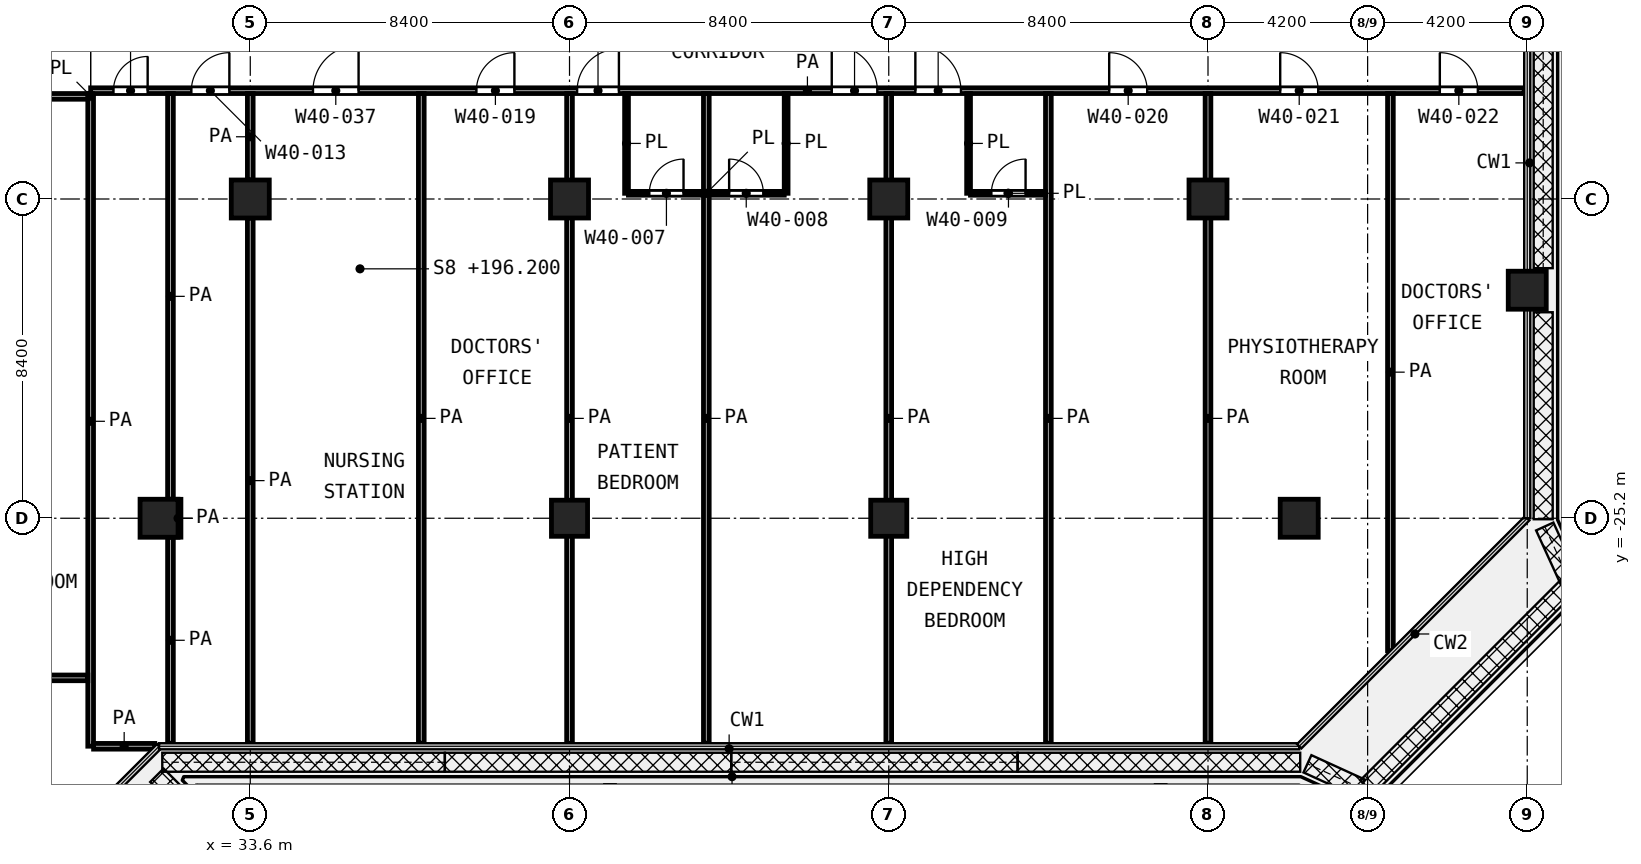
"""IFC4 building model, lengths in metres.
Left out: names, types, materials, properties, quantities, classifications, styles, units other than length and angle.
Written with IfcOpenShell. Run it as: python <this file> out.ifc"""

import sys

from ifc_helpers import new_model, si_unit, direction, frame, frame_2d, origin, origin_2d, place, context, subcontext, project, spatial, rectangle, extrude, element, fill, save


model = new_model("IFC4")
c1 = context("Model", 3, precision=1e-05, world=origin(), true_north=direction((0.0, 1.0)))
c2 = subcontext(c1, "Body", "Model", "MODEL_VIEW")
j1 = project(units=[si_unit("LENGTHUNIT", "METRE"), si_unit("PLANEANGLEUNIT", "RADIAN")], contexts=[c1])
p1 = place(None, origin())
s1 = spatial("IfcSite", under=j1, at=p1, CompositionType="ELEMENT")
p2 = place(p1, origin())
s2 = spatial("IfcBuilding", under=s1, at=p2, CompositionType="ELEMENT")
p3 = place(p2, frame((0.0, 0.0, 196.2)))
s3 = spatial("IfcBuildingStorey", under=s2, at=p3, CompositionType="ELEMENT", Elevation=196.2)
for number, where, z_axis, x_axis in (
    (1, (33.6, -16.8, 0.0), (0.0, 0.0, 1.0), (1.0, 0.0, 0.0)),
    (2, (42.0, -16.8, 0.0), (0.0, 0.0, 1.0), (1.0, 0.0, 0.0)),
    (3, (50.4, -16.8, 0.0), (0.0, 0.0, 1.0), (1.0, 0.0, 0.0)),
    (4, (58.8, -16.8, 0.0), (0.0, 0.0, 1.0), (1.0, 0.0, 0.0)),
    (5, (67.2, -19.2, 0.0), (0.0, 0.0, 1.0), (1.0, 0.0, 0.0)),
    (6, (31.2, -25.2, 0.0), (0.0, 0.0, 1.0), (1.0, 0.0, 0.0)),
):
    element("IfcColumn", number, at=place(p3, frame(where, z_axis=z_axis, x_axis=x_axis)), inside=s3, PredefinedType="COLUMN", context=c2, shape_type="SweptSolid", body=[
        extrude(rectangle(XDim=1.0, YDim=1.0, at=origin_2d()), origin(), (0.0, 0.0, 1.0), 4.2),
    ])
for number, where, z_axis, x_axis in (
    (7, (42.0, -25.2, 0.0), (0.0, 0.0, 1.0), (1.0, 0.0, 0.0)),
    (8, (50.4, -25.2, 0.0), (0.0, 0.0, 1.0), (1.0, 0.0, 0.0)),
):
    element("IfcColumn", number, at=place(p3, frame(where, z_axis=z_axis, x_axis=x_axis)), inside=s3, PredefinedType="COLUMN", context=c2, shape_type="SweptSolid", body=[
        extrude(rectangle(XDim=0.95, YDim=0.95, at=origin_2d()), origin(), (0.0, 0.0, 1.0), 4.2),
    ])
p4 = place(p3, frame((61.2, -25.2, 0.0), z_axis=(0.0, 0.0, 1.0), x_axis=(1.0, 0.0, 0.0)))
e9 = element("IfcColumn", 9, at=p4, inside=s3, PredefinedType="COLUMN", context=c2, shape_type="SweptSolid", body=[
    extrude(rectangle(XDim=1.0, YDim=1.0, at=origin_2d()), origin(), (0.0, 0.0, 1.0), 4.2),
])
p5 = place(p3, frame((43.55, -16.65, 0.0), z_axis=(0.0, 0.0, 1.0), x_axis=(1.0, 0.0, 0.0)))
e10 = element("IfcWall", 10, at=p5, inside=s3, PredefinedType="PARTITIONING", context=c2, shape_type="SweptSolid", body=[
    extrude(rectangle(XDim=4.1, YDim=0.1, at=frame_2d((2.05, 0.0))), origin(), (0.0, 0.0, 1.0), 3.6),
])
p6 = place(p5, frame((0.55, 0.0, 0.0)))
e11 = element("IfcOpeningElement", 11, at=p6, cuts=e10, PredefinedType="OPENING", context=c2, shape_type="SweptSolid", body=[
    extrude(rectangle(XDim=0.9, YDim=2.1, at=frame_2d((0.45, 1.05))), frame((0.0, 0.06, 0.0), z_axis=(0.0, -1.0, 0.0), x_axis=(1.0, 0.0, 0.0)), (0.0, 0.0, 1.0), 0.12),
])
p7 = place(p5, frame((2.65, 0.0, 0.0)))
e12 = element("IfcOpeningElement", 12, at=p7, cuts=e10, PredefinedType="OPENING", context=c2, shape_type="SweptSolid", body=[
    extrude(rectangle(XDim=0.9, YDim=2.1, at=frame_2d((0.45, 1.05))), frame((0.0, 0.06, 0.0), z_axis=(0.0, -1.0, 0.0), x_axis=(1.0, 0.0, 0.0)), (0.0, 0.0, 1.0), 0.12),
])
p8 = place(p3, frame((52.55, -16.65, 0.0), z_axis=(0.0, 0.0, 1.0), x_axis=(1.0, 0.0, 0.0)))
e13 = element("IfcWall", 13, at=p8, inside=s3, PredefinedType="PARTITIONING", context=c2, shape_type="SweptSolid", body=[
    extrude(rectangle(XDim=1.975, YDim=0.1, at=frame_2d((0.987, 0.0))), origin(), (0.0, 0.0, 1.0), 3.6),
])
p9 = place(p8, frame((0.55, 0.0, 0.0)))
e14 = element("IfcOpeningElement", 14, at=p9, cuts=e13, PredefinedType="OPENING", context=c2, shape_type="SweptSolid", body=[
    extrude(rectangle(XDim=0.9, YDim=2.1, at=frame_2d((0.45, 1.05))), frame((0.0, 0.06, 0.0), z_axis=(0.0, -1.0, 0.0), x_axis=(1.0, 0.0, 0.0)), (0.0, 0.0, 1.0), 0.12),
])
p10 = place(p3, frame((29.4, -14.147, 0.0), z_axis=(0.0, 0.0, 1.0), x_axis=(0.0, 1.0, 0.0)))
e15 = element("IfcWall", 15, at=p10, inside=s3, PredefinedType="PARTITIONING", context=c2, shape_type="SweptSolid", body=[
    extrude(rectangle(XDim=0.12, YDim=0.1, at=frame_2d((0.06, 0.0))), origin(), (0.0, 0.0, 1.0), 3.6),
])
for number, where, z_axis, x_axis in (
    (16, (43.5, -16.65, 0.0), (0.0, 0.0, 1.0), (0.0, 1.0, 0.0)),
    (17, (47.7, -16.65, 0.0), (0.0, 0.0, 1.0), (0.0, 1.0, 0.0)),
    (18, (52.5, -16.65, 0.0), (0.0, 0.0, 1.0), (0.0, 1.0, 0.0)),
):
    element("IfcWall", number, at=place(p3, frame(where, z_axis=z_axis, x_axis=x_axis)), inside=s3, PredefinedType="PARTITIONING", context=c2, shape_type="SweptSolid", body=[
        extrude(rectangle(XDim=2.625, YDim=0.1, at=frame_2d((1.312, 0.0))), origin(), (0.0, 0.0, 1.0), 3.6),
    ])
p11 = place(p3, frame((29.477, -31.2, 0.0), z_axis=(0.0, 0.0, 1.0), x_axis=(1.0, 0.0, 0.0)))
e19 = element("IfcWall", 19, at=p11, inside=s3, PredefinedType="PARTITIONING", context=c2, shape_type="SweptSolid", body=[
    extrude(rectangle(XDim=1.61, YDim=0.15, at=frame_2d((0.805, 0.0))), origin(), (0.0, 0.0, 1.0), 3.6),
])
p12 = place(p3, frame((14.175, -29.4, 0.0), z_axis=(0.0, 0.0, 1.0), x_axis=(1.0, 0.0, 0.0)))
e20 = element("IfcWall", 20, at=p12, inside=s3, PredefinedType="PARTITIONING", context=c2, shape_type="SweptSolid", body=[
    extrude(rectangle(XDim=15.15, YDim=0.15, at=frame_2d((7.575, 0.0))), origin(), (0.0, 0.0, 1.0), 3.6),
])
p13 = place(p3, frame((24.9, -14.1, 0.0), z_axis=(0.0, 0.0, 1.0), x_axis=(1.0, 0.0, 0.0)))
e21 = element("IfcWall", 21, at=p13, inside=s3, PredefinedType="PARTITIONING", context=c2, shape_type="SweptSolid", body=[
    extrude(rectangle(XDim=4.425, YDim=0.15, at=frame_2d((2.212, 0.0))), origin(), (0.0, 0.0, 1.0), 3.6),
])
p14 = place(p13, frame((1.65, 0.0, 0.0)))
e22 = element("IfcOpeningElement", 22, at=p14, cuts=e21, PredefinedType="OPENING", context=c2, shape_type="SweptSolid", body=[
    extrude(rectangle(XDim=1.5, YDim=2.1, at=frame_2d((0.75, 1.05))), frame((0.0, 0.085, 0.0), z_axis=(0.0, -1.0, 0.0), x_axis=(1.0, 0.0, 0.0)), (0.0, 0.0, 1.0), 0.17),
])
p15 = place(p3, frame((29.4, -13.95, 0.0), z_axis=(0.0, 0.0, 1.0), x_axis=(1.0, 0.0, 0.0)))
e23 = element("IfcWall", 23, at=p15, inside=s3, PredefinedType="PARTITIONING", context=c2, shape_type="SweptSolid", body=[
    extrude(rectangle(XDim=37.72, YDim=0.15, at=frame_2d((18.86, 0.0))), origin(), (0.0, 0.0, 1.0), 3.6),
])
p16 = place(p15, frame((10.15, 0.0, 0.0)))
e24 = element("IfcOpeningElement", 24, at=p16, cuts=e23, PredefinedType="OPENING", context=c2, shape_type="SweptSolid", body=[
    extrude(rectangle(XDim=1.0, YDim=2.1, at=frame_2d((0.5, 1.05))), frame((0.0, 0.085, 0.0), z_axis=(0.0, -1.0, 0.0), x_axis=(1.0, 0.0, 0.0)), (0.0, 0.0, 1.0), 0.17),
])
p17 = place(p15, frame((12.8, 0.0, 0.0)))
e25 = element("IfcOpeningElement", 25, at=p17, cuts=e23, PredefinedType="OPENING", context=c2, shape_type="SweptSolid", body=[
    extrude(rectangle(XDim=1.1, YDim=2.1, at=frame_2d((0.55, 1.05))), frame((0.0, 0.085, 0.0), z_axis=(0.0, -1.0, 0.0), x_axis=(1.0, 0.0, 0.0)), (0.0, 0.0, 1.0), 0.17),
])
p18 = place(p15, frame((19.5, 0.0, 0.0)))
e26 = element("IfcOpeningElement", 26, at=p18, cuts=e23, PredefinedType="OPENING", context=c2, shape_type="SweptSolid", body=[
    extrude(rectangle(XDim=1.2, YDim=2.1, at=frame_2d((0.6, 1.05))), frame((0.0, 0.085, 0.0), z_axis=(0.0, -1.0, 0.0), x_axis=(1.0, 0.0, 0.0)), (0.0, 0.0, 1.0), 0.17),
])
p19 = place(p15, frame((21.7, 0.0, 0.0)))
e27 = element("IfcOpeningElement", 27, at=p19, cuts=e23, PredefinedType="OPENING", context=c2, shape_type="SweptSolid", body=[
    extrude(rectangle(XDim=1.2, YDim=2.1, at=frame_2d((0.6, 1.05))), frame((0.0, 0.085, 0.0), z_axis=(0.0, -1.0, 0.0), x_axis=(1.0, 0.0, 0.0)), (0.0, 0.0, 1.0), 0.17),
])
p20 = place(p15, frame((26.8, 0.0, 0.0)))
e28 = element("IfcOpeningElement", 28, at=p20, cuts=e23, PredefinedType="OPENING", context=c2, shape_type="SweptSolid", body=[
    extrude(rectangle(XDim=1.0, YDim=2.1, at=frame_2d((0.5, 1.05))), frame((0.0, 0.085, 0.0), z_axis=(0.0, -1.0, 0.0), x_axis=(1.0, 0.0, 0.0)), (0.0, 0.0, 1.0), 0.17),
])
p21 = place(p15, frame((31.3, 0.0, 0.0)))
e29 = element("IfcOpeningElement", 29, at=p21, cuts=e23, PredefinedType="OPENING", context=c2, shape_type="SweptSolid", body=[
    extrude(rectangle(XDim=1.0, YDim=2.1, at=frame_2d((0.5, 1.05))), frame((0.0, 0.085, 0.0), z_axis=(0.0, -1.0, 0.0), x_axis=(1.0, 0.0, 0.0)), (0.0, 0.0, 1.0), 0.17),
])
p22 = place(p15, frame((35.5, 0.0, 0.0)))
e30 = element("IfcOpeningElement", 30, at=p22, cuts=e23, PredefinedType="OPENING", context=c2, shape_type="SweptSolid", body=[
    extrude(rectangle(XDim=1.0, YDim=2.1, at=frame_2d((0.5, 1.05))), frame((0.0, 0.085, 0.0), z_axis=(0.0, -1.0, 0.0), x_axis=(1.0, 0.0, 0.0)), (0.0, 0.0, 1.0), 0.17),
])
p23 = place(p15, frame((0.6, 0.0, 0.0)))
e31 = element("IfcOpeningElement", 31, at=p23, cuts=e23, PredefinedType="OPENING", context=c2, shape_type="SweptSolid", body=[
    extrude(rectangle(XDim=0.9, YDim=2.1, at=frame_2d((0.45, 1.05))), frame((0.0, 0.085, 0.0), z_axis=(0.0, -1.0, 0.0), x_axis=(1.0, 0.0, 0.0)), (0.0, 0.0, 1.0), 0.17),
])
p24 = place(p15, frame((2.65, 0.0, 0.0)))
e32 = element("IfcOpeningElement", 32, at=p24, cuts=e23, PredefinedType="OPENING", context=c2, shape_type="SweptSolid", body=[
    extrude(rectangle(XDim=1.0, YDim=2.1, at=frame_2d((0.5, 1.05))), frame((0.0, 0.085, 0.0), z_axis=(0.0, -1.0, 0.0), x_axis=(1.0, 0.0, 0.0)), (0.0, 0.0, 1.0), 0.17),
])
p25 = place(p15, frame((5.85, 0.0, 0.0)))
e33 = element("IfcOpeningElement", 33, at=p25, cuts=e23, PredefinedType="OPENING", context=c2, shape_type="SweptSolid", body=[
    extrude(rectangle(XDim=1.2, YDim=2.1, at=frame_2d((0.6, 1.05))), frame((0.0, 0.085, 0.0), z_axis=(0.0, -1.0, 0.0), x_axis=(1.0, 0.0, 0.0)), (0.0, 0.0, 1.0), 0.17),
])
p26 = place(p3, frame((29.4, -31.198, 0.0), z_axis=(0.0, 0.0, 1.0), x_axis=(0.0, 1.0, 0.0)))
e34 = element("IfcWall", 34, at=p26, inside=s3, PredefinedType="PARTITIONING", context=c2, shape_type="SweptSolid", body=[
    extrude(rectangle(XDim=17.098, YDim=0.15, at=frame_2d((8.549, 0.0))), origin(), (0.0, 0.0, 1.0), 3.6),
])
p27 = place(p3, frame((31.5, -31.12, 0.0), z_axis=(0.0, 0.0, 1.0), x_axis=(0.0, 1.0, 0.0)))
e35 = element("IfcWall", 35, at=p27, inside=s3, PredefinedType="PARTITIONING", context=c2, shape_type="SweptSolid", body=[
    extrude(rectangle(XDim=5.418, YDim=0.15, at=frame_2d((2.709, 0.0))), origin(), (0.0, 0.0, 1.0), 3.6),
])
p28 = place(p3, frame((31.5, -24.698, 0.0), z_axis=(0.0, 0.0, 1.0), x_axis=(0.0, 1.0, 0.0)))
e36 = element("IfcWall", 36, at=p28, inside=s3, PredefinedType="PARTITIONING", context=c2, shape_type="SweptSolid", body=[
    extrude(rectangle(XDim=10.673, YDim=0.15, at=frame_2d((5.336, 0.0))), origin(), (0.0, 0.0, 1.0), 3.6),
])
p29 = place(p3, frame((31.7, -25.698, 0.0), z_axis=(0.0, 0.0, 1.0), x_axis=(0.0, 1.0, 0.0)))
e37 = element("IfcWall", 37, at=p29, inside=s3, PredefinedType="PARTITIONING", context=c2, shape_type="SweptSolid", body=[
    extrude(rectangle(XDim=0.996, YDim=0.15, at=frame_2d((0.498, 0.0))), origin(), (0.0, 0.0, 1.0), 3.6),
])
p30 = place(p3, frame((33.6, -31.12, 0.0), z_axis=(0.0, 0.0, 1.0), x_axis=(0.0, 1.0, 0.0)))
e38 = element("IfcWall", 38, at=p30, inside=s3, PredefinedType="PARTITIONING", context=c2, shape_type="SweptSolid", body=[
    extrude(rectangle(XDim=13.82, YDim=0.15, at=frame_2d((6.91, 0.0))), origin(), (0.0, 0.0, 1.0), 3.6),
])
p31 = place(p3, frame((33.6, -16.3, 0.0), z_axis=(0.0, 0.0, 1.0), x_axis=(0.0, 1.0, 0.0)))
e39 = element("IfcWall", 39, at=p31, inside=s3, PredefinedType="PARTITIONING", context=c2, shape_type="SweptSolid", body=[
    extrude(rectangle(XDim=2.275, YDim=0.15, at=frame_2d((1.138, 0.0))), origin(), (0.0, 0.0, 1.0), 3.6),
])
for number, where, z_axis, x_axis in (
    (40, (38.1, -31.12, 0.0), (0.0, 0.0, 1.0), (0.0, 1.0, 0.0)),
    (41, (42.0, -31.12, 0.0), (0.0, 0.0, 1.0), (0.0, 1.0, 0.0)),
    (42, (45.6, -31.12, 0.0), (0.0, 0.0, 1.0), (0.0, 1.0, 0.0)),
    (43, (50.4, -31.12, 0.0), (0.0, 0.0, 1.0), (0.0, 1.0, 0.0)),
    (44, (54.6, -31.12, 0.0), (0.0, 0.0, 1.0), (0.0, 1.0, 0.0)),
    (45, (58.8, -31.12, 0.0), (0.0, 0.0, 1.0), (0.0, 1.0, 0.0)),
):
    element("IfcWall", number, at=place(p3, frame(where, z_axis=z_axis, x_axis=x_axis)), inside=s3, PredefinedType="PARTITIONING", context=c2, shape_type="SweptSolid", body=[
        extrude(rectangle(XDim=17.095, YDim=0.15, at=frame_2d((8.548, 0.0))), origin(), (0.0, 0.0, 1.0), 3.6),
    ])
p32 = place(p3, frame((63.6, -28.687, 0.0), z_axis=(0.0, 0.0, 1.0), x_axis=(0.0, 1.0, 0.0)))
e46 = element("IfcWall", 46, at=p32, inside=s3, PredefinedType="PARTITIONING", context=c2, shape_type="SweptSolid", body=[
    extrude(rectangle(XDim=14.662, YDim=0.15, at=frame_2d((7.331, 0.0))), origin(), (0.0, 0.0, 1.0), 3.6),
])
p33 = place(p16, origin())
e47 = element("IfcDoor", 47, at=p33, inside=s3, OperationType="SINGLE_SWING_RIGHT", PredefinedType="DOOR", context=c2, shape_type="SweptSolid", body=[
    extrude(rectangle(XDim=1.0, YDim=2.1, at=frame_2d((0.5, 1.05))), frame((0.0, 0.025, 0.0), z_axis=(0.0, -1.0, 0.0), x_axis=(1.0, 0.0, 0.0)), (0.0, 0.0, 1.0), 0.05),
])
fill(e24, e47)
p34 = place(p17, origin())
e48 = element("IfcDoor", 48, at=p34, inside=s3, OperationType="SINGLE_SWING_RIGHT", PredefinedType="DOOR", context=c2, shape_type="SweptSolid", body=[
    extrude(rectangle(XDim=1.1, YDim=2.1, at=frame_2d((0.55, 1.05))), frame((0.0, 0.025, 0.0), z_axis=(0.0, -1.0, 0.0), x_axis=(1.0, 0.0, 0.0)), (0.0, 0.0, 1.0), 0.05),
])
fill(e25, e48)
p35 = place(p6, origin())
e49 = element("IfcDoor", 49, at=p35, inside=s3, OperationType="SINGLE_SWING_RIGHT", PredefinedType="DOOR", context=c2, shape_type="SweptSolid", body=[
    extrude(rectangle(XDim=0.9, YDim=2.1, at=frame_2d((0.45, 1.05))), frame((0.0, 0.025, 0.0), z_axis=(0.0, -1.0, 0.0), x_axis=(1.0, 0.0, 0.0)), (0.0, 0.0, 1.0), 0.05),
])
fill(e11, e49)
p36 = place(p18, origin())
e50 = element("IfcDoor", 50, at=p36, inside=s3, OperationType="SINGLE_SWING_LEFT", PredefinedType="DOOR", context=c2, shape_type="SweptSolid", body=[
    extrude(rectangle(XDim=1.2, YDim=2.1, at=frame_2d((0.6, 1.05))), frame((0.0, 0.025, 0.0), z_axis=(0.0, -1.0, 0.0), x_axis=(1.0, 0.0, 0.0)), (0.0, 0.0, 1.0), 0.05),
])
fill(e26, e50)
p37 = place(p7, origin())
e51 = element("IfcDoor", 51, at=p37, inside=s3, OperationType="SINGLE_SWING_LEFT", PredefinedType="DOOR", context=c2, shape_type="SweptSolid", body=[
    extrude(rectangle(XDim=0.9, YDim=2.1, at=frame_2d((0.45, 1.05))), frame((0.0, 0.025, 0.0), z_axis=(0.0, -1.0, 0.0), x_axis=(1.0, 0.0, 0.0)), (0.0, 0.0, 1.0), 0.05),
])
fill(e12, e51)
p38 = place(p19, origin())
e52 = element("IfcDoor", 52, at=p38, inside=s3, OperationType="SINGLE_SWING_LEFT", PredefinedType="DOOR", context=c2, shape_type="SweptSolid", body=[
    extrude(rectangle(XDim=1.2, YDim=2.1, at=frame_2d((0.6, 1.05))), frame((0.0, 0.025, 0.0), z_axis=(0.0, -1.0, 0.0), x_axis=(1.0, 0.0, 0.0)), (0.0, 0.0, 1.0), 0.05),
])
fill(e27, e52)
p39 = place(p9, origin())
e53 = element("IfcDoor", 53, at=p39, inside=s3, OperationType="SINGLE_SWING_RIGHT", PredefinedType="DOOR", context=c2, shape_type="SweptSolid", body=[
    extrude(rectangle(XDim=0.9, YDim=2.1, at=frame_2d((0.45, 1.05))), frame((0.0, 0.025, 0.0), z_axis=(0.0, -1.0, 0.0), x_axis=(1.0, 0.0, 0.0)), (0.0, 0.0, 1.0), 0.05),
])
fill(e14, e53)
p40 = place(p20, origin())
e54 = element("IfcDoor", 54, at=p40, inside=s3, OperationType="SINGLE_SWING_LEFT", PredefinedType="DOOR", context=c2, shape_type="SweptSolid", body=[
    extrude(rectangle(XDim=1.0, YDim=2.1, at=frame_2d((0.5, 1.05))), frame((0.0, 0.025, 0.0), z_axis=(0.0, -1.0, 0.0), x_axis=(1.0, 0.0, 0.0)), (0.0, 0.0, 1.0), 0.05),
])
fill(e28, e54)
p41 = place(p21, origin())
e55 = element("IfcDoor", 55, at=p41, inside=s3, OperationType="SINGLE_SWING_LEFT", PredefinedType="DOOR", context=c2, shape_type="SweptSolid", body=[
    extrude(rectangle(XDim=1.0, YDim=2.1, at=frame_2d((0.5, 1.05))), frame((0.0, 0.025, 0.0), z_axis=(0.0, -1.0, 0.0), x_axis=(1.0, 0.0, 0.0)), (0.0, 0.0, 1.0), 0.05),
])
fill(e29, e55)
p42 = place(p22, origin())
e56 = element("IfcDoor", 56, at=p42, inside=s3, OperationType="SINGLE_SWING_LEFT", PredefinedType="DOOR", context=c2, shape_type="SweptSolid", body=[
    extrude(rectangle(XDim=1.0, YDim=2.1, at=frame_2d((0.5, 1.05))), frame((0.0, 0.025, 0.0), z_axis=(0.0, -1.0, 0.0), x_axis=(1.0, 0.0, 0.0)), (0.0, 0.0, 1.0), 0.05),
])
fill(e30, e56)
p43 = place(p23, origin())
e57 = element("IfcDoor", 57, at=p43, inside=s3, OperationType="SINGLE_SWING_RIGHT", PredefinedType="DOOR", context=c2, shape_type="SweptSolid", body=[
    extrude(rectangle(XDim=0.9, YDim=2.1, at=frame_2d((0.45, 1.05))), frame((0.0, 0.025, 0.0), z_axis=(0.0, -1.0, 0.0), x_axis=(1.0, 0.0, 0.0)), (0.0, 0.0, 1.0), 0.05),
])
fill(e31, e57)
p44 = place(p24, origin())
e58 = element("IfcDoor", 58, at=p44, inside=s3, OperationType="SINGLE_SWING_RIGHT", PredefinedType="DOOR", context=c2, shape_type="SweptSolid", body=[
    extrude(rectangle(XDim=1.0, YDim=2.1, at=frame_2d((0.5, 1.05))), frame((0.0, 0.025, 0.0), z_axis=(0.0, -1.0, 0.0), x_axis=(1.0, 0.0, 0.0)), (0.0, 0.0, 1.0), 0.05),
])
fill(e32, e58)
p45 = place(p25, origin())
e59 = element("IfcDoor", 59, at=p45, inside=s3, OperationType="SINGLE_SWING_RIGHT", PredefinedType="DOOR", context=c2, shape_type="SweptSolid", body=[
    extrude(rectangle(XDim=1.2, YDim=2.1, at=frame_2d((0.6, 1.05))), frame((0.0, 0.025, 0.0), z_axis=(0.0, -1.0, 0.0), x_axis=(1.0, 0.0, 0.0)), (0.0, 0.0, 1.0), 0.05),
])
fill(e33, e59)
save(model, sys.argv[1])
